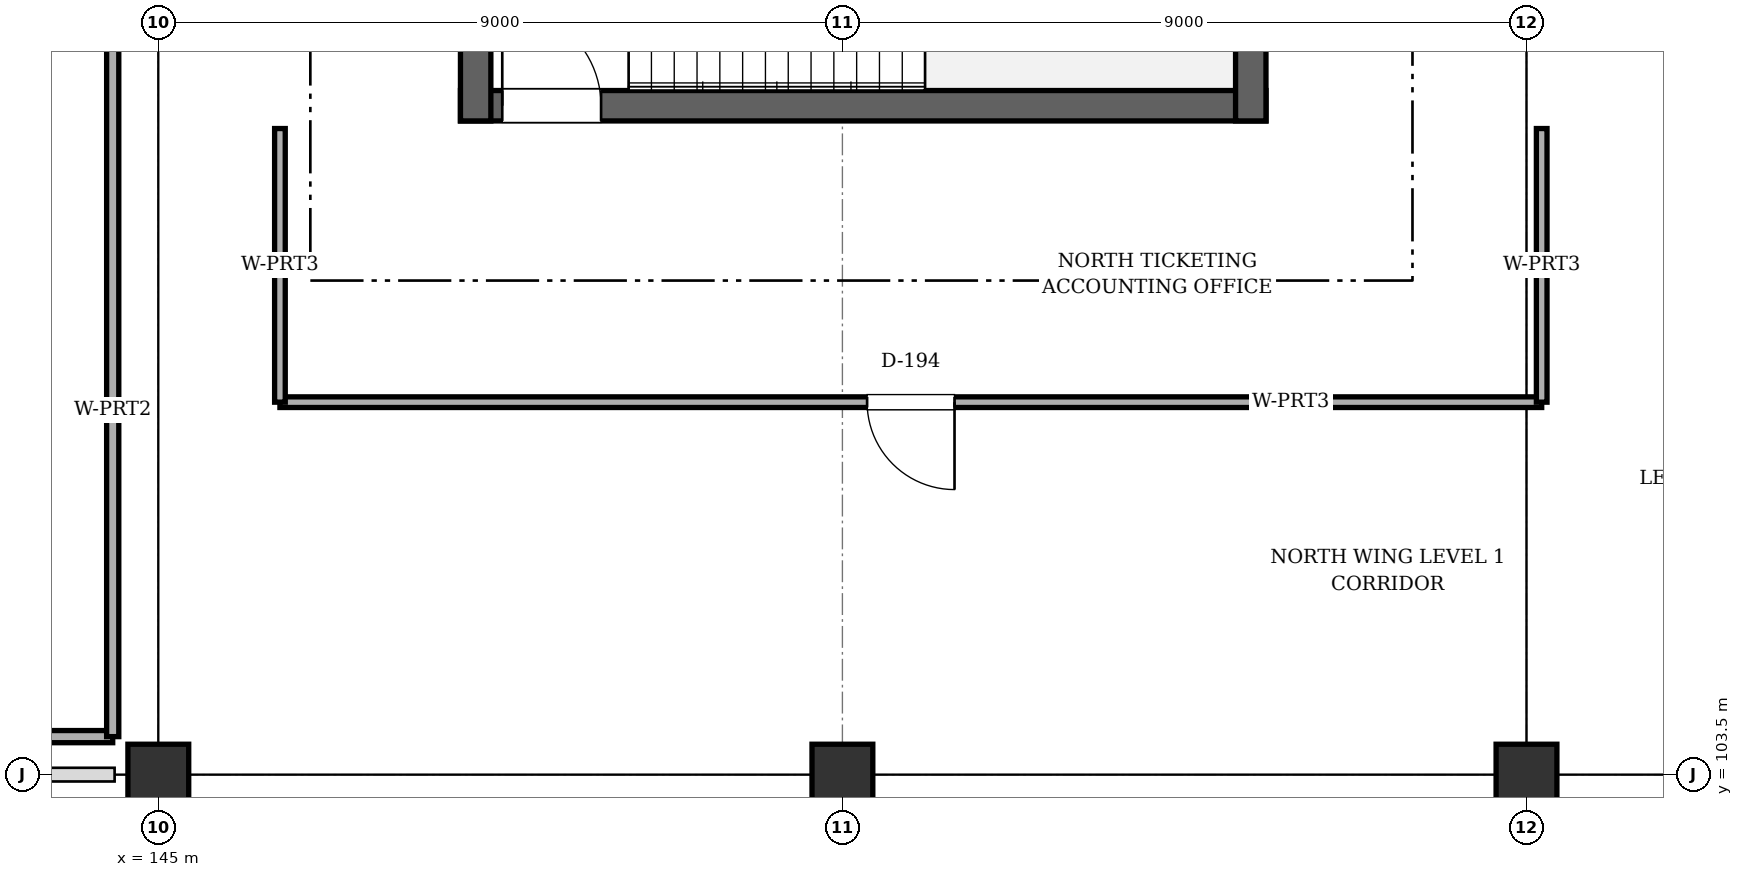
"""IFC4 building model, lengths in metres.
Left out: names, types, materials, properties, quantities, classifications, styles, units other than length and angle.
Written with IfcOpenShell. Run it as: python <this file> out.ifc"""

import sys

from ifc_helpers import new_model, si_unit, direction, frame, frame_2d, origin, origin_2d, place, context, subcontext, project, spatial, rectangle, extrude, element, fill, save


model = new_model("IFC4")
c1 = context("Model", 3, precision=1e-05, world=origin(), true_north=direction((0.0, 1.0)))
c2 = subcontext(c1, "Body", "Model", "MODEL_VIEW")
j1 = project(units=[si_unit("LENGTHUNIT", "METRE"), si_unit("PLANEANGLEUNIT", "RADIAN")], contexts=[c1])
p1 = place(None, origin())
s1 = spatial("IfcSite", under=j1, at=p1, CompositionType="ELEMENT")
p2 = place(p1, origin())
s2 = spatial("IfcBuilding", under=s1, at=p2, CompositionType="ELEMENT")
p3 = place(p2, frame((0.0, 0.0, 6.6)))
s3 = spatial("IfcBuildingStorey", under=s2, at=p3, CompositionType="ELEMENT", Elevation=6.6)
for number, where, z_axis, x_axis in (
    (1, (145.0, 103.5, 0.0), (0.0, 0.0, 1.0), (1.0, 0.0, 0.0)),
    (2, (154.0, 103.5, 0.0), (0.0, 0.0, 1.0), (1.0, 0.0, 0.0)),
    (3, (163.0, 103.5, 0.0), (0.0, 0.0, 1.0), (1.0, 0.0, 0.0)),
):
    element("IfcColumn", number, at=place(p3, frame(where, z_axis=z_axis, x_axis=x_axis)), inside=s3, PredefinedType="COLUMN", context=c2, shape_type="SweptSolid", body=[
        extrude(rectangle(XDim=0.8, YDim=0.8, at=origin_2d()), origin(), (0.0, 0.0, 1.0), 4.2),
    ])
p4 = place(p3, frame((148.975, 112.3, 0.0), z_axis=(0.0, 0.0, 1.0), x_axis=(1.0, 0.0, 0.0)))
e4 = element("IfcWall", 4, at=p4, inside=s3, PredefinedType="SHEAR", context=c2, shape_type="SweptSolid", body=[
    extrude(rectangle(XDim=10.597, YDim=0.4, at=frame_2d((5.299, 0.0))), origin(), (0.0, 0.0, 1.0), 3.98),
])
p5 = place(p4, frame((0.55, 0.0, 0.0)))
e5 = element("IfcOpeningElement", 5, at=p5, cuts=e4, PredefinedType="OPENING", context=c2, shape_type="SweptSolid", body=[
    extrude(rectangle(XDim=1.3, YDim=2.1, at=frame_2d((0.65, 1.05))), frame((0.0, 0.21, 0.0), z_axis=(0.0, -1.0, 0.0), x_axis=(1.0, 0.0, 0.0)), (0.0, 0.0, 1.0), 0.42),
])
for number, where, z_axis, x_axis in (
    (6, (159.373, 112.1, 0.0), (0.0, 0.0, 1.0), (0.0, 1.0, 0.0)),
    (7, (149.175, 116.52, 0.0), (0.0, 0.0, 1.0), (0.0, -1.0, 0.0)),
):
    element("IfcWall", number, at=place(p3, frame(where, z_axis=z_axis, x_axis=x_axis)), inside=s3, PredefinedType="SHEAR", context=c2, shape_type="SweptSolid", body=[
        extrude(rectangle(XDim=4.42, YDim=0.4, at=frame_2d((2.21, 0.0))), origin(), (0.0, 0.0, 1.0), 3.98),
    ])
p6 = place(p3, frame((144.4, 104.0, 0.0), z_axis=(0.0, 0.0, 1.0), x_axis=(-1.0, 0.0, 0.0)))
e8 = element("IfcWall", 8, at=p6, inside=s3, PredefinedType="PARTITIONING", context=c2, shape_type="SweptSolid", body=[
    extrude(rectangle(XDim=26.8, YDim=0.16, at=frame_2d((13.4, 0.0))), origin(), (0.0, 0.0, 1.0), 3.355),
])
p7 = place(p3, frame((144.4, 125.4, 0.0), z_axis=(0.0, 0.0, 1.0), x_axis=(0.0, -1.0, 0.0)))
e9 = element("IfcWall", 9, at=p7, inside=s3, PredefinedType="PARTITIONING", context=c2, shape_type="SweptSolid", body=[
    extrude(rectangle(XDim=21.4, YDim=0.16, at=frame_2d((10.7, 0.0))), origin(), (0.0, 0.0, 1.0), 3.355),
])
p8 = place(p7, frame((9.925, 0.0, 0.0)))
e10 = element("IfcOpeningElement", 10, at=p8, cuts=e9, PredefinedType="OPENING", context=c2, shape_type="SweptSolid", body=[
    extrude(rectangle(XDim=1.55, YDim=2.1, at=frame_2d((0.775, 1.05))), frame((0.0, 0.09, 0.0), z_axis=(0.0, -1.0, 0.0), x_axis=(1.0, 0.0, 0.0)), (0.0, 0.0, 1.0), 0.18),
])
p9 = place(p3, frame((163.2, 108.4, 0.0), z_axis=(0.0, 0.0, 1.0), x_axis=(-1.0, 0.0, 0.0)))
e11 = element("IfcWall", 11, at=p9, inside=s3, PredefinedType="PARTITIONING", context=c2, shape_type="SweptSolid", body=[
    extrude(rectangle(XDim=16.6, YDim=0.14, at=frame_2d((8.3, 0.0))), origin(), (0.0, 0.0, 1.0), 3.355),
])
p10 = place(p9, frame((7.725, 0.0, 0.0)))
e12 = element("IfcOpeningElement", 12, at=p10, cuts=e11, PredefinedType="OPENING", context=c2, shape_type="SweptSolid", body=[
    extrude(rectangle(XDim=1.15, YDim=2.1, at=frame_2d((0.575, 1.05))), frame((0.0, 0.08, 0.0), z_axis=(0.0, -1.0, 0.0), x_axis=(1.0, 0.0, 0.0)), (0.0, 0.0, 1.0), 0.16),
])
p11 = place(p3, frame((146.6, 108.4, 0.0), z_axis=(0.0, 0.0, 1.0), x_axis=(0.0, 1.0, 0.0)))
e13 = element("IfcWall", 13, at=p11, inside=s3, PredefinedType="PARTITIONING", context=c2, shape_type="SweptSolid", body=[
    extrude(rectangle(XDim=3.6, YDim=0.14, at=frame_2d((1.8, 0.0))), origin(), (0.0, 0.0, 1.0), 3.955),
])
p12 = place(p3, frame((163.2, 112.0, 0.0), z_axis=(0.0, 0.0, 1.0), x_axis=(0.0, -1.0, 0.0)))
e14 = element("IfcWall", 14, at=p12, inside=s3, PredefinedType="PARTITIONING", context=c2, shape_type="SweptSolid", body=[
    extrude(rectangle(XDim=3.6, YDim=0.14, at=frame_2d((1.8, 0.0))), origin(), (0.0, 0.0, 1.0), 3.355),
])
p13 = place(p5, origin())
e15 = element("IfcDoor", 15, at=p13, inside=s3, OperationType="SINGLE_SWING_LEFT", PredefinedType="DOOR", context=c2, shape_type="SweptSolid", body=[
    extrude(rectangle(XDim=1.3, YDim=2.1, at=frame_2d((0.65, 1.05))), frame((0.0, 0.025, 0.0), z_axis=(0.0, -1.0, 0.0), x_axis=(1.0, 0.0, 0.0)), (0.0, 0.0, 1.0), 0.05),
])
fill(e5, e15)
p14 = place(p10, origin())
e16 = element("IfcDoor", 16, at=p14, inside=s3, OperationType="SINGLE_SWING_LEFT", PredefinedType="DOOR", context=c2, shape_type="SweptSolid", body=[
    extrude(rectangle(XDim=1.15, YDim=2.1, at=frame_2d((0.575, 1.05))), frame((0.0, 0.025, 0.0), z_axis=(0.0, -1.0, 0.0), x_axis=(1.0, 0.0, 0.0)), (0.0, 0.0, 1.0), 0.05),
])
fill(e12, e16)
save(model, sys.argv[1])
